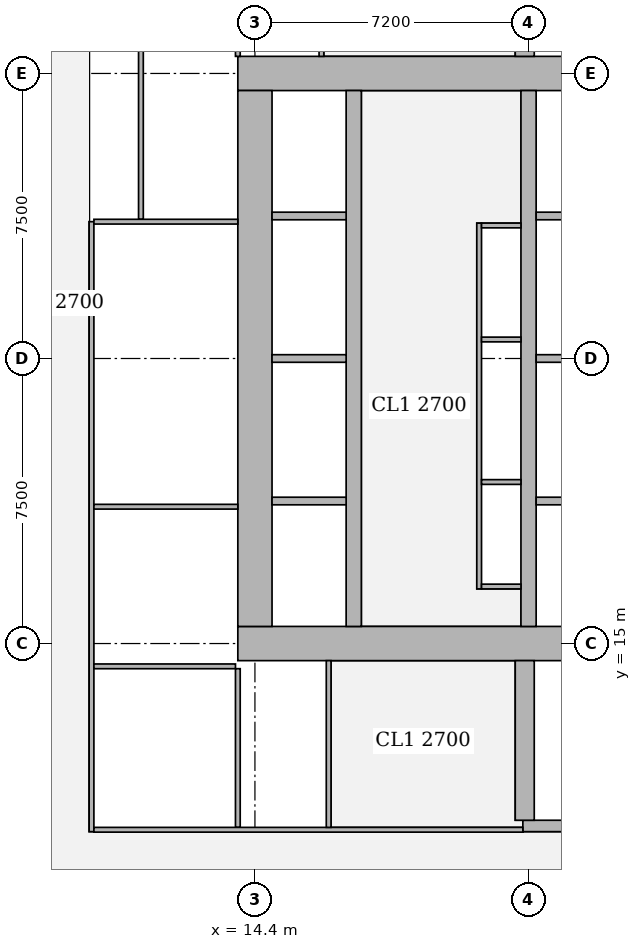
"""IFC4 building model, lengths in metres.
Left out: names, types, materials, properties, quantities, classifications, styles, units other than length and angle.
Written with IfcOpenShell. Run it as: python <this file> out.ifc"""

import sys

from ifc_helpers import new_model, si_unit, direction, frame, frame_2d, origin, place, context, subcontext, project, spatial, rectangle, extrude, element, fill, save


model = new_model("IFC4")
c1 = context("Model", 3, precision=1e-05, world=origin(), true_north=direction((0.0, 1.0)))
c2 = subcontext(c1, "Body", "Model", "MODEL_VIEW")
j1 = project(units=[si_unit("LENGTHUNIT", "METRE"), si_unit("PLANEANGLEUNIT", "RADIAN")], contexts=[c1])
p1 = place(None, origin())
s1 = spatial("IfcSite", under=j1, at=p1, CompositionType="ELEMENT")
p2 = place(p1, origin())
s2 = spatial("IfcBuilding", under=s1, at=p2, CompositionType="ELEMENT")
p3 = place(p2, frame((0.0, 0.0, 81.65)))
s3 = spatial("IfcBuildingStorey", under=s2, at=p3, CompositionType="ELEMENT", Elevation=81.65)
p4 = place(p3, frame((13.95, 15.0, 0.0), z_axis=(0.0, 0.0, 1.0), x_axis=(1.0, 0.0, 0.0)))
e1 = element("IfcWall", 1, at=p4, inside=s3, PredefinedType="SHEAR", context=c2, shape_type="SweptSolid", body=[
    extrude(rectangle(XDim=15.3, YDim=0.9, at=frame_2d((7.65, 0.0))), origin(), (0.0, 0.0, 1.0), 3.75),
])
p5 = place(p4, frame((4.45, 0.0, 0.0)))
e2 = element("IfcOpeningElement", 2, at=p5, cuts=e1, PredefinedType="OPENING", context=c2, shape_type="SweptSolid", body=[
    extrude(rectangle(XDim=1.8, YDim=2.1, at=frame_2d((0.9, 1.05))), frame((0.0, 0.46, 0.0), z_axis=(0.0, -1.0, 0.0), x_axis=(1.0, 0.0, 0.0)), (0.0, 0.0, 1.0), 0.92),
])
p6 = place(p4, frame((10.7, 0.0, 0.0)))
e3 = element("IfcOpeningElement", 3, at=p6, cuts=e1, PredefinedType="OPENING", context=c2, shape_type="SweptSolid", body=[
    extrude(rectangle(XDim=1.1, YDim=2.1, at=frame_2d((0.55, 1.05))), frame((0.0, 0.46, 0.0), z_axis=(0.0, -1.0, 0.0), x_axis=(1.0, 0.0, 0.0)), (0.0, 0.0, 1.0), 0.92),
])
p7 = place(p3, frame((13.95, 30.0, 0.0), z_axis=(0.0, 0.0, 1.0), x_axis=(1.0, 0.0, 0.0)))
e4 = element("IfcWall", 4, at=p7, inside=s3, PredefinedType="SHEAR", context=c2, shape_type="SweptSolid", body=[
    extrude(rectangle(XDim=15.3, YDim=0.9, at=frame_2d((7.65, 0.0))), origin(), (0.0, 0.0, 1.0), 3.75),
])
p8 = place(p7, frame((4.45, 0.0, 0.0)))
e5 = element("IfcOpeningElement", 5, at=p8, cuts=e4, PredefinedType="OPENING", context=c2, shape_type="SweptSolid", body=[
    extrude(rectangle(XDim=1.8, YDim=2.1, at=frame_2d((0.9, 1.05))), frame((0.0, 0.46, 0.0), z_axis=(0.0, -1.0, 0.0), x_axis=(1.0, 0.0, 0.0)), (0.0, 0.0, 1.0), 0.92),
])
p9 = place(p7, frame((10.7, 0.0, 0.0)))
e6 = element("IfcOpeningElement", 6, at=p9, cuts=e4, PredefinedType="OPENING", context=c2, shape_type="SweptSolid", body=[
    extrude(rectangle(XDim=1.1, YDim=2.1, at=frame_2d((0.55, 1.05))), frame((0.0, 0.46, 0.0), z_axis=(0.0, -1.0, 0.0), x_axis=(1.0, 0.0, 0.0)), (0.0, 0.0, 1.0), 0.92),
])
p10 = place(p3, frame((14.4, 15.45, 0.0), z_axis=(0.0, 0.0, 1.0), x_axis=(0.0, 1.0, 0.0)))
e7 = element("IfcWall", 7, at=p10, inside=s3, PredefinedType="SHEAR", context=c2, shape_type="SweptSolid", body=[
    extrude(rectangle(XDim=14.1, YDim=0.9, at=frame_2d((7.05, 0.0))), origin(), (0.0, 0.0, 1.0), 3.75),
])
p11 = place(p3, frame((17.0, 15.45, 0.0), z_axis=(0.0, 0.0, 1.0), x_axis=(0.0, 1.0, 0.0)))
e8 = element("IfcWall", 8, at=p11, inside=s3, PredefinedType="SHEAR", context=c2, shape_type="SweptSolid", body=[
    extrude(rectangle(XDim=14.1, YDim=0.4, at=frame_2d((7.05, 0.0))), origin(), (0.0, 0.0, 1.0), 3.75),
])
p12 = place(p11, frame((0.875, 0.0, 0.0)))
e9 = element("IfcOpeningElement", 9, at=p12, cuts=e8, PredefinedType="OPENING", context=c2, shape_type="SweptSolid", body=[
    extrude(rectangle(XDim=1.1, YDim=2.1, at=frame_2d((0.55, 1.05))), frame((0.0, 0.21, 0.0), z_axis=(0.0, -1.0, 0.0), x_axis=(1.0, 0.0, 0.0)), (0.0, 0.0, 1.0), 0.42),
])
p13 = place(p11, frame((4.625, 0.0, 0.0)))
e10 = element("IfcOpeningElement", 10, at=p13, cuts=e8, PredefinedType="OPENING", context=c2, shape_type="SweptSolid", body=[
    extrude(rectangle(XDim=1.1, YDim=2.1, at=frame_2d((0.55, 1.05))), frame((0.0, 0.21, 0.0), z_axis=(0.0, -1.0, 0.0), x_axis=(1.0, 0.0, 0.0)), (0.0, 0.0, 1.0), 0.42),
])
p14 = place(p11, frame((8.375, 0.0, 0.0)))
e11 = element("IfcOpeningElement", 11, at=p14, cuts=e8, PredefinedType="OPENING", context=c2, shape_type="SweptSolid", body=[
    extrude(rectangle(XDim=1.1, YDim=2.1, at=frame_2d((0.55, 1.05))), frame((0.0, 0.21, 0.0), z_axis=(0.0, -1.0, 0.0), x_axis=(1.0, 0.0, 0.0)), (0.0, 0.0, 1.0), 0.42),
])
p15 = place(p11, frame((12.125, 0.0, 0.0)))
e12 = element("IfcOpeningElement", 12, at=p15, cuts=e8, PredefinedType="OPENING", context=c2, shape_type="SweptSolid", body=[
    extrude(rectangle(XDim=1.1, YDim=2.1, at=frame_2d((0.55, 1.05))), frame((0.0, 0.21, 0.0), z_axis=(0.0, -1.0, 0.0), x_axis=(1.0, 0.0, 0.0)), (0.0, 0.0, 1.0), 0.42),
])
p16 = place(p3, frame((21.6, 15.45, 0.0), z_axis=(0.0, 0.0, 1.0), x_axis=(0.0, 1.0, 0.0)))
e13 = element("IfcWall", 13, at=p16, inside=s3, PredefinedType="SHEAR", context=c2, shape_type="SweptSolid", body=[
    extrude(rectangle(XDim=14.1, YDim=0.4, at=frame_2d((7.05, 0.0))), origin(), (0.0, 0.0, 1.0), 3.75),
])
p17 = place(p3, frame((21.45, 10.2, 0.0), z_axis=(0.0, 0.0, 1.0), x_axis=(1.0, 0.0, 0.0)))
e14 = element("IfcWall", 14, at=p17, inside=s3, PredefinedType="SHEAR", context=c2, shape_type="SweptSolid", body=[
    extrude(rectangle(XDim=7.5, YDim=0.3, at=frame_2d((3.75, 0.0))), origin(), (0.0, 0.0, 1.0), 3.75),
])
p18 = place(p17, frame((0.5, 0.0, 0.0)))
e15 = element("IfcOpeningElement", 15, at=p18, cuts=e14, PredefinedType="OPENING", context=c2, shape_type="SweptSolid", body=[
    extrude(rectangle(XDim=1.1, YDim=2.1, at=frame_2d((0.55, 1.05))), frame((0.0, 0.16, 0.0), z_axis=(0.0, -1.0, 0.0), x_axis=(1.0, 0.0, 0.0)), (0.0, 0.0, 1.0), 0.32),
])
for number, where, z_axis, x_axis in (
    (16, (21.5, 10.35, 0.0), (0.0, 0.0, 1.0), (0.0, 1.0, 0.0)),
    (17, (21.5, 30.45, 0.0), (0.0, 0.0, 1.0), (0.0, 1.0, 0.0)),
):
    element("IfcWall", number, at=place(p3, frame(where, z_axis=z_axis, x_axis=x_axis)), inside=s3, PredefinedType="SHEAR", context=c2, shape_type="SweptSolid", body=[
        extrude(rectangle(XDim=4.2, YDim=0.5, at=frame_2d((2.1, 0.0))), origin(), (0.0, 0.0, 1.0), 3.75),
    ])
p19 = place(p3, frame((10.1, 10.05, 0.0), z_axis=(0.0, 0.0, 1.0), x_axis=(0.0, 1.0, 0.0)))
e18 = element("IfcWall", 18, at=p19, inside=s3, PredefinedType="PARTITIONING", context=c2, shape_type="SweptSolid", body=[
    extrude(rectangle(XDim=16.05, YDim=0.125, at=frame_2d((8.025, 0.0))), origin(), (0.0, 0.0, 1.0), 3.5),
])
p20 = place(p19, frame((1.675, 0.0, 0.0)))
e19 = element("IfcOpeningElement", 19, at=p20, cuts=e18, PredefinedType="OPENING", context=c2, shape_type="SweptSolid", body=[
    extrude(rectangle(XDim=1.0, YDim=2.1, at=frame_2d((0.5, 1.05))), frame((0.0, 0.073, 0.0), z_axis=(0.0, -1.0, 0.0), x_axis=(1.0, 0.0, 0.0)), (0.0, 0.0, 1.0), 0.145),
])
p21 = place(p19, frame((5.95, 0.0, 0.0)))
e20 = element("IfcOpeningElement", 20, at=p21, cuts=e18, PredefinedType="OPENING", context=c2, shape_type="SweptSolid", body=[
    extrude(rectangle(XDim=1.0, YDim=2.1, at=frame_2d((0.5, 1.05))), frame((0.0, 0.073, 0.0), z_axis=(0.0, -1.0, 0.0), x_axis=(1.0, 0.0, 0.0)), (0.0, 0.0, 1.0), 0.145),
])
p22 = place(p19, frame((11.8, 0.0, 0.0)))
e21 = element("IfcOpeningElement", 21, at=p22, cuts=e18, PredefinedType="OPENING", context=c2, shape_type="SweptSolid", body=[
    extrude(rectangle(XDim=1.0, YDim=2.1, at=frame_2d((0.5, 1.05))), frame((0.0, 0.073, 0.0), z_axis=(0.0, -1.0, 0.0), x_axis=(1.0, 0.0, 0.0)), (0.0, 0.0, 1.0), 0.145),
])
p23 = place(p3, frame((11.4, 26.163, 0.0), z_axis=(0.0, 0.0, 1.0), x_axis=(0.0, 1.0, 0.0)))
e22 = element("IfcWall", 22, at=p23, inside=s3, PredefinedType="PARTITIONING", context=c2, shape_type="SweptSolid", body=[
    extrude(rectangle(XDim=5.275, YDim=0.125, at=frame_2d((2.637, 0.0))), origin(), (0.0, 0.0, 1.0), 3.5),
])
p24 = place(p23, frame((2.137, 0.0, 0.0)))
e23 = element("IfcOpeningElement", 23, at=p24, cuts=e22, PredefinedType="OPENING", context=c2, shape_type="SweptSolid", body=[
    extrude(rectangle(XDim=1.0, YDim=2.1, at=frame_2d((0.5, 1.05))), frame((0.0, 0.073, 0.0), z_axis=(0.0, -1.0, 0.0), x_axis=(1.0, 0.0, 0.0)), (0.0, 0.0, 1.0), 0.145),
])
p25 = place(p3, frame((10.163, 14.4, 0.0), z_axis=(0.0, 0.0, 1.0), x_axis=(1.0, 0.0, 0.0)))
e24 = element("IfcWall", 24, at=p25, inside=s3, PredefinedType="PARTITIONING", context=c2, shape_type="SweptSolid", body=[
    extrude(rectangle(XDim=3.725, YDim=0.125, at=frame_2d((1.862, 0.0))), origin(), (0.0, 0.0, 1.0), 3.5),
])
for number, where, z_axis, x_axis in (
    (25, (10.163, 18.6, 0.0), (0.0, 0.0, 1.0), (1.0, 0.0, 0.0)),
    (26, (10.163, 26.1, 0.0), (0.0, 0.0, 1.0), (1.0, 0.0, 0.0)),
):
    element("IfcWall", number, at=place(p3, frame(where, z_axis=z_axis, x_axis=x_axis)), inside=s3, PredefinedType="PARTITIONING", context=c2, shape_type="SweptSolid", body=[
        extrude(rectangle(XDim=3.787, YDim=0.125, at=frame_2d((1.894, 0.0))), origin(), (0.0, 0.0, 1.0), 3.5),
    ])
p26 = place(p3, frame((13.95, 10.163, 0.0), z_axis=(0.0, 0.0, 1.0), x_axis=(0.0, 1.0, 0.0)))
e27 = element("IfcWall", 27, at=p26, inside=s3, PredefinedType="PARTITIONING", context=c2, shape_type="SweptSolid", body=[
    extrude(rectangle(XDim=4.175, YDim=0.125, at=frame_2d((2.087, 0.0))), origin(), (0.0, 0.0, 1.0), 3.5),
])
p27 = place(p3, frame((13.95, 30.45, 0.0), z_axis=(0.0, 0.0, 1.0), x_axis=(0.0, 1.0, 0.0)))
e28 = element("IfcWall", 28, at=p27, inside=s3, PredefinedType="PARTITIONING", context=c2, shape_type="SweptSolid", body=[
    extrude(rectangle(XDim=4.387, YDim=0.125, at=frame_2d((2.193, 0.0))), origin(), (0.0, 0.0, 1.0), 3.5),
])
p28 = place(p3, frame((10.163, 10.1, 0.0), z_axis=(0.0, 0.0, 1.0), x_axis=(1.0, 0.0, 0.0)))
e29 = element("IfcWall", 29, at=p28, inside=s3, PredefinedType="PARTITIONING", context=c2, shape_type="SweptSolid", body=[
    extrude(rectangle(XDim=11.287, YDim=0.125, at=frame_2d((5.644, 0.0))), origin(), (0.0, 0.0, 1.0), 3.5),
])
p29 = place(p28, frame((7.832, 0.0, 0.0)))
e30 = element("IfcOpeningElement", 30, at=p29, cuts=e29, PredefinedType="OPENING", context=c2, shape_type="SweptSolid", body=[
    extrude(rectangle(XDim=1.8, YDim=2.1, at=frame_2d((0.9, 1.05))), frame((0.0, 0.073, 0.0), z_axis=(0.0, -1.0, 0.0), x_axis=(1.0, 0.0, 0.0)), (0.0, 0.0, 1.0), 0.145),
])
p30 = place(p3, frame((16.34, 10.163, 0.0), z_axis=(0.0, 0.0, 1.0), x_axis=(0.0, 1.0, 0.0)))
e31 = element("IfcWall", 31, at=p30, inside=s3, PredefinedType="PARTITIONING", context=c2, shape_type="SweptSolid", body=[
    extrude(rectangle(XDim=4.387, YDim=0.125, at=frame_2d((2.193, 0.0))), origin(), (0.0, 0.0, 1.0), 3.5),
])
p31 = place(p30, frame((1.637, 0.0, 0.0)))
e32 = element("IfcOpeningElement", 32, at=p31, cuts=e31, PredefinedType="OPENING", context=c2, shape_type="SweptSolid", body=[
    extrude(rectangle(XDim=1.0, YDim=2.1, at=frame_2d((0.5, 1.05))), frame((0.0, 0.073, 0.0), z_axis=(0.0, -1.0, 0.0), x_axis=(1.0, 0.0, 0.0)), (0.0, 0.0, 1.0), 0.145),
])
p32 = place(p3, frame((16.15, 30.45, 0.0), z_axis=(0.0, 0.0, 1.0), x_axis=(0.0, 1.0, 0.0)))
e33 = element("IfcWall", 33, at=p32, inside=s3, PredefinedType="PARTITIONING", context=c2, shape_type="SweptSolid", body=[
    extrude(rectangle(XDim=4.387, YDim=0.125, at=frame_2d((2.193, 0.0))), origin(), (0.0, 0.0, 1.0), 3.5),
])
p33 = place(p32, frame((1.75, 0.0, 0.0)))
e34 = element("IfcOpeningElement", 34, at=p33, cuts=e33, PredefinedType="OPENING", context=c2, shape_type="SweptSolid", body=[
    extrude(rectangle(XDim=1.0, YDim=2.1, at=frame_2d((0.5, 1.05))), frame((0.0, 0.073, 0.0), z_axis=(0.0, -1.0, 0.0), x_axis=(1.0, 0.0, 0.0)), (0.0, 0.0, 1.0), 0.145),
])
p34 = place(p3, frame((20.3, 16.438, 0.0), z_axis=(0.0, 0.0, 1.0), x_axis=(0.0, 1.0, 0.0)))
e35 = element("IfcWall", 35, at=p34, inside=s3, PredefinedType="PARTITIONING", context=c2, shape_type="SweptSolid", body=[
    extrude(rectangle(XDim=9.624, YDim=0.125, at=frame_2d((4.812, 0.0))), origin(), (0.0, 0.0, 1.0), 3.5),
])
p35 = place(p34, frame((0.937, 0.0, 0.0)))
e36 = element("IfcOpeningElement", 36, at=p35, cuts=e35, PredefinedType="OPENING", context=c2, shape_type="SweptSolid", body=[
    extrude(rectangle(XDim=1.0, YDim=2.1, at=frame_2d((0.5, 1.05))), frame((0.0, 0.073, 0.0), z_axis=(0.0, -1.0, 0.0), x_axis=(1.0, 0.0, 0.0)), (0.0, 0.0, 1.0), 0.145),
])
p36 = place(p34, frame((4.187, 0.0, 0.0)))
e37 = element("IfcOpeningElement", 37, at=p36, cuts=e35, PredefinedType="OPENING", context=c2, shape_type="SweptSolid", body=[
    extrude(rectangle(XDim=1.0, YDim=2.1, at=frame_2d((0.5, 1.05))), frame((0.0, 0.073, 0.0), z_axis=(0.0, -1.0, 0.0), x_axis=(1.0, 0.0, 0.0)), (0.0, 0.0, 1.0), 0.145),
])
p37 = place(p34, frame((7.562, 0.0, 0.0)))
e38 = element("IfcOpeningElement", 38, at=p37, cuts=e35, PredefinedType="OPENING", context=c2, shape_type="SweptSolid", body=[
    extrude(rectangle(XDim=1.0, YDim=2.1, at=frame_2d((0.5, 1.05))), frame((0.0, 0.073, 0.0), z_axis=(0.0, -1.0, 0.0), x_axis=(1.0, 0.0, 0.0)), (0.0, 0.0, 1.0), 0.145),
])
for number, where, z_axis, x_axis in (
    (39, (20.363, 16.5, 0.0), (0.0, 0.0, 1.0), (1.0, 0.0, 0.0)),
    (40, (20.363, 26.0, 0.0), (0.0, 0.0, 1.0), (1.0, 0.0, 0.0)),
    (41, (20.363, 19.25, 0.0), (0.0, 0.0, 1.0), (1.0, 0.0, 0.0)),
    (42, (20.363, 23.0, 0.0), (0.0, 0.0, 1.0), (1.0, 0.0, 0.0)),
):
    element("IfcWall", number, at=place(p3, frame(where, z_axis=z_axis, x_axis=x_axis)), inside=s3, PredefinedType="PARTITIONING", context=c2, shape_type="SweptSolid", body=[
        extrude(rectangle(XDim=1.037, YDim=0.125, at=frame_2d((0.519, 0.0))), origin(), (0.0, 0.0, 1.0), 3.5),
    ])
p38 = place(p3, frame((14.85, 18.75, 0.0), z_axis=(0.0, 0.0, 1.0), x_axis=(1.0, 0.0, 0.0)))
e43 = element("IfcWall", 43, at=p38, inside=s3, PredefinedType="SOLIDWALL", context=c2, shape_type="SweptSolid", body=[
    extrude(rectangle(XDim=1.95, YDim=0.2, at=frame_2d((0.975, 0.0))), origin(), (0.0, 0.0, 1.0), 3.5),
])
p39 = place(p3, frame((21.8, 18.75, 0.0), z_axis=(0.0, 0.0, 1.0), x_axis=(1.0, 0.0, 0.0)))
e44 = element("IfcWall", 44, at=p39, inside=s3, PredefinedType="SOLIDWALL", context=c2, shape_type="SweptSolid", body=[
    extrude(rectangle(XDim=2.2, YDim=0.2, at=frame_2d((1.1, 0.0))), origin(), (0.0, 0.0, 1.0), 3.5),
])
p40 = place(p3, frame((14.85, 22.5, 0.0), z_axis=(0.0, 0.0, 1.0), x_axis=(1.0, 0.0, 0.0)))
e45 = element("IfcWall", 45, at=p40, inside=s3, PredefinedType="SOLIDWALL", context=c2, shape_type="SweptSolid", body=[
    extrude(rectangle(XDim=1.95, YDim=0.2, at=frame_2d((0.975, 0.0))), origin(), (0.0, 0.0, 1.0), 3.5),
])
p41 = place(p3, frame((21.8, 22.5, 0.0), z_axis=(0.0, 0.0, 1.0), x_axis=(1.0, 0.0, 0.0)))
e46 = element("IfcWall", 46, at=p41, inside=s3, PredefinedType="SOLIDWALL", context=c2, shape_type="SweptSolid", body=[
    extrude(rectangle(XDim=2.2, YDim=0.2, at=frame_2d((1.1, 0.0))), origin(), (0.0, 0.0, 1.0), 3.5),
])
p42 = place(p3, frame((14.85, 26.25, 0.0), z_axis=(0.0, 0.0, 1.0), x_axis=(1.0, 0.0, 0.0)))
e47 = element("IfcWall", 47, at=p42, inside=s3, PredefinedType="SOLIDWALL", context=c2, shape_type="SweptSolid", body=[
    extrude(rectangle(XDim=1.95, YDim=0.2, at=frame_2d((0.975, 0.0))), origin(), (0.0, 0.0, 1.0), 3.5),
])
p43 = place(p3, frame((21.8, 26.25, 0.0), z_axis=(0.0, 0.0, 1.0), x_axis=(1.0, 0.0, 0.0)))
e48 = element("IfcWall", 48, at=p43, inside=s3, PredefinedType="SOLIDWALL", context=c2, shape_type="SweptSolid", body=[
    extrude(rectangle(XDim=2.2, YDim=0.2, at=frame_2d((1.1, 0.0))), origin(), (0.0, 0.0, 1.0), 3.5),
])
p44 = place(p20, origin())
e49 = element("IfcDoor", 49, at=p44, inside=s3, OperationType="SINGLE_SWING_RIGHT", PredefinedType="DOOR", context=c2, shape_type="SweptSolid", body=[
    extrude(rectangle(XDim=1.0, YDim=2.1, at=frame_2d((0.5, 1.05))), frame((0.0, 0.025, 0.0), z_axis=(0.0, -1.0, 0.0), x_axis=(1.0, 0.0, 0.0)), (0.0, 0.0, 1.0), 0.05),
])
fill(e19, e49)
p45 = place(p21, origin())
e50 = element("IfcDoor", 50, at=p45, inside=s3, OperationType="SINGLE_SWING_RIGHT", PredefinedType="DOOR", context=c2, shape_type="SweptSolid", body=[
    extrude(rectangle(XDim=1.0, YDim=2.1, at=frame_2d((0.5, 1.05))), frame((0.0, 0.025, 0.0), z_axis=(0.0, -1.0, 0.0), x_axis=(1.0, 0.0, 0.0)), (0.0, 0.0, 1.0), 0.05),
])
fill(e20, e50)
p46 = place(p22, origin())
e51 = element("IfcDoor", 51, at=p46, inside=s3, OperationType="SINGLE_SWING_LEFT", PredefinedType="DOOR", context=c2, shape_type="SweptSolid", body=[
    extrude(rectangle(XDim=1.0, YDim=2.1, at=frame_2d((0.5, 1.05))), frame((0.0, 0.025, 0.0), z_axis=(0.0, -1.0, 0.0), x_axis=(1.0, 0.0, 0.0)), (0.0, 0.0, 1.0), 0.05),
])
fill(e21, e51)
p47 = place(p24, origin())
e52 = element("IfcDoor", 52, at=p47, inside=s3, OperationType="SINGLE_SWING_RIGHT", PredefinedType="DOOR", context=c2, shape_type="SweptSolid", body=[
    extrude(rectangle(XDim=1.0, YDim=2.1, at=frame_2d((0.5, 1.05))), frame((0.0, 0.025, 0.0), z_axis=(0.0, -1.0, 0.0), x_axis=(1.0, 0.0, 0.0)), (0.0, 0.0, 1.0), 0.05),
])
fill(e23, e52)
p48 = place(p31, origin())
e53 = element("IfcDoor", 53, at=p48, inside=s3, OperationType="SINGLE_SWING_LEFT", PredefinedType="DOOR", context=c2, shape_type="SweptSolid", body=[
    extrude(rectangle(XDim=1.0, YDim=2.1, at=frame_2d((0.5, 1.05))), frame((0.0, 0.025, 0.0), z_axis=(0.0, -1.0, 0.0), x_axis=(1.0, 0.0, 0.0)), (0.0, 0.0, 1.0), 0.05),
])
fill(e32, e53)
p49 = place(p29, origin())
e54 = element("IfcDoor", 54, at=p49, inside=s3, OperationType="DOUBLE_DOOR_SINGLE_SWING", PredefinedType="DOOR", context=c2, shape_type="SweptSolid", body=[
    extrude(rectangle(XDim=1.8, YDim=2.1, at=frame_2d((0.9, 1.05))), frame((0.0, 0.025, 0.0), z_axis=(0.0, -1.0, 0.0), x_axis=(1.0, 0.0, 0.0)), (0.0, 0.0, 1.0), 0.05),
])
fill(e30, e54)
p50 = place(p35, origin())
e55 = element("IfcDoor", 55, at=p50, inside=s3, OperationType="SINGLE_SWING_RIGHT", PredefinedType="DOOR", context=c2, shape_type="SweptSolid", body=[
    extrude(rectangle(XDim=1.0, YDim=2.1, at=frame_2d((0.5, 1.05))), frame((0.0, 0.025, 0.0), z_axis=(0.0, -1.0, 0.0), x_axis=(1.0, 0.0, 0.0)), (0.0, 0.0, 1.0), 0.05),
])
fill(e36, e55)
p51 = place(p36, origin())
e56 = element("IfcDoor", 56, at=p51, inside=s3, OperationType="SINGLE_SWING_RIGHT", PredefinedType="DOOR", context=c2, shape_type="SweptSolid", body=[
    extrude(rectangle(XDim=1.0, YDim=2.1, at=frame_2d((0.5, 1.05))), frame((0.0, 0.025, 0.0), z_axis=(0.0, -1.0, 0.0), x_axis=(1.0, 0.0, 0.0)), (0.0, 0.0, 1.0), 0.05),
])
fill(e37, e56)
p52 = place(p37, origin())
e57 = element("IfcDoor", 57, at=p52, inside=s3, OperationType="SINGLE_SWING_LEFT", PredefinedType="DOOR", context=c2, shape_type="SweptSolid", body=[
    extrude(rectangle(XDim=1.0, YDim=2.1, at=frame_2d((0.5, 1.05))), frame((0.0, 0.025, 0.0), z_axis=(0.0, -1.0, 0.0), x_axis=(1.0, 0.0, 0.0)), (0.0, 0.0, 1.0), 0.05),
])
fill(e38, e57)
p53 = place(p5, origin())
e58 = element("IfcDoor", 58, at=p53, inside=s3, OperationType="DOUBLE_DOOR_SINGLE_SWING", PredefinedType="DOOR", context=c2, shape_type="SweptSolid", body=[
    extrude(rectangle(XDim=1.8, YDim=2.1, at=frame_2d((0.9, 1.05))), frame((0.0, 0.025, 0.0), z_axis=(0.0, -1.0, 0.0), x_axis=(1.0, 0.0, 0.0)), (0.0, 0.0, 1.0), 0.05),
])
fill(e2, e58)
p54 = place(p8, origin())
e59 = element("IfcDoor", 59, at=p54, inside=s3, OperationType="DOUBLE_DOOR_SINGLE_SWING", PredefinedType="DOOR", context=c2, shape_type="SweptSolid", body=[
    extrude(rectangle(XDim=1.8, YDim=2.1, at=frame_2d((0.9, 1.05))), frame((0.0, 0.025, 0.0), z_axis=(0.0, -1.0, 0.0), x_axis=(1.0, 0.0, 0.0)), (0.0, 0.0, 1.0), 0.05),
])
fill(e5, e59)
p55 = place(p12, origin())
e60 = element("IfcDoor", 60, at=p55, inside=s3, OperationType="DOUBLE_DOOR_SLIDING", PredefinedType="DOOR", context=c2, shape_type="SweptSolid", body=[
    extrude(rectangle(XDim=1.1, YDim=2.1, at=frame_2d((0.55, 1.05))), frame((0.0, 0.025, 0.0), z_axis=(0.0, -1.0, 0.0), x_axis=(1.0, 0.0, 0.0)), (0.0, 0.0, 1.0), 0.05),
])
fill(e9, e60)
p56 = place(p13, origin())
e61 = element("IfcDoor", 61, at=p56, inside=s3, OperationType="DOUBLE_DOOR_SLIDING", PredefinedType="DOOR", context=c2, shape_type="SweptSolid", body=[
    extrude(rectangle(XDim=1.1, YDim=2.1, at=frame_2d((0.55, 1.05))), frame((0.0, 0.025, 0.0), z_axis=(0.0, -1.0, 0.0), x_axis=(1.0, 0.0, 0.0)), (0.0, 0.0, 1.0), 0.05),
])
fill(e10, e61)
p57 = place(p14, origin())
e62 = element("IfcDoor", 62, at=p57, inside=s3, OperationType="DOUBLE_DOOR_SLIDING", PredefinedType="DOOR", context=c2, shape_type="SweptSolid", body=[
    extrude(rectangle(XDim=1.1, YDim=2.1, at=frame_2d((0.55, 1.05))), frame((0.0, 0.025, 0.0), z_axis=(0.0, -1.0, 0.0), x_axis=(1.0, 0.0, 0.0)), (0.0, 0.0, 1.0), 0.05),
])
fill(e11, e62)
p58 = place(p15, origin())
e63 = element("IfcDoor", 63, at=p58, inside=s3, OperationType="DOUBLE_DOOR_SLIDING", PredefinedType="DOOR", context=c2, shape_type="SweptSolid", body=[
    extrude(rectangle(XDim=1.1, YDim=2.1, at=frame_2d((0.55, 1.05))), frame((0.0, 0.025, 0.0), z_axis=(0.0, -1.0, 0.0), x_axis=(1.0, 0.0, 0.0)), (0.0, 0.0, 1.0), 0.05),
])
fill(e12, e63)
p59 = place(p18, origin())
e64 = element("IfcDoor", 64, at=p59, inside=s3, OperationType="SINGLE_SWING_LEFT", PredefinedType="DOOR", context=c2, shape_type="SweptSolid", body=[
    extrude(rectangle(XDim=1.1, YDim=2.1, at=frame_2d((0.55, 1.05))), frame((0.0, 0.025, 0.0), z_axis=(0.0, -1.0, 0.0), x_axis=(1.0, 0.0, 0.0)), (0.0, 0.0, 1.0), 0.05),
])
fill(e15, e64)
save(model, sys.argv[1])
